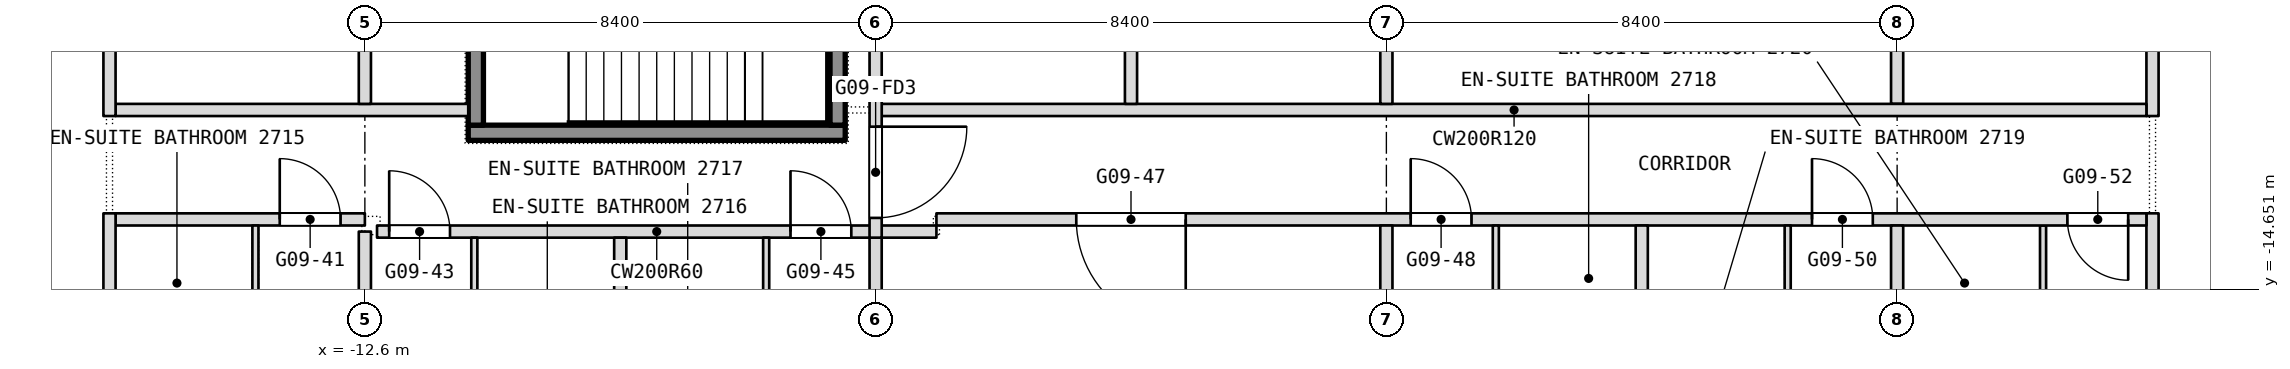
"""IFC4 building model, lengths in metres.
Left out: names, types, materials, properties, quantities, classifications, styles, units other than length and angle.
Written with IfcOpenShell. Run it as: python <this file> out.ifc"""

import sys

from ifc_helpers import new_model, si_unit, direction, frame, frame_2d, origin, place, context, subcontext, project, spatial, rectangle, extrude, element, fill, save


model = new_model("IFC4")
c1 = context("Model", 3, precision=1e-05, world=origin(), true_north=direction((0.0, 1.0)))
c2 = subcontext(c1, "Body", "Model", "MODEL_VIEW")
j1 = project(units=[si_unit("LENGTHUNIT", "METRE"), si_unit("PLANEANGLEUNIT", "RADIAN")], contexts=[c1])
p1 = place(None, origin())
s1 = spatial("IfcSite", under=j1, at=p1, CompositionType="ELEMENT")
p2 = place(p1, origin())
s2 = spatial("IfcBuilding", under=s1, at=p2, CompositionType="ELEMENT")
p3 = place(p2, frame((0.0, 0.0, 122.9)))
s3 = spatial("IfcBuildingStorey", under=s2, at=p3, CompositionType="ELEMENT", Elevation=122.9)
p4 = place(p3, frame((16.8, -22.186, 0.0), z_axis=(0.0, 0.0, 1.0), x_axis=(0.0, 1.0, 0.0)))
e1 = element("IfcWall", 1, at=p4, inside=s3, PredefinedType="PARTITIONING", context=c2, shape_type="SweptSolid", body=[
    extrude(rectangle(XDim=8.786, YDim=0.2, at=frame_2d((4.393, 0.0))), origin(), (0.0, 0.0, 1.0), 3.34),
])
p5 = place(p3, frame((16.8, -11.8, 0.0), z_axis=(0.0, 0.0, 1.0), x_axis=(0.0, 1.0, 0.0)))
e2 = element("IfcWall", 2, at=p5, inside=s3, PredefinedType="PARTITIONING", context=c2, shape_type="SweptSolid", body=[
    extrude(rectangle(XDim=9.9, YDim=0.2, at=frame_2d((4.95, 0.0))), origin(), (0.0, 0.0, 1.0), 3.34),
])
p6 = place(p3, frame((15.0, -16.45, 0.0), z_axis=(0.0, 0.0, 1.0), x_axis=(0.0, 1.0, 0.0)))
e3 = element("IfcWall", 3, at=p6, inside=s3, PredefinedType="PARTITIONING", context=c2, shape_type="SweptSolid", body=[
    extrude(rectangle(XDim=2.85, YDim=0.1, at=frame_2d((1.425, 0.0))), origin(), (0.0, 0.0, 1.0), 3.34),
])
p7 = place(p3, frame((-12.4, -13.7, 0.0), z_axis=(0.0, 0.0, 1.0), x_axis=(1.0, 0.0, 0.0)))
e4 = element("IfcWall", 4, at=p7, inside=s3, PredefinedType="PARTITIONING", context=c2, shape_type="SweptSolid", body=[
    extrude(rectangle(XDim=9.2, YDim=0.2, at=frame_2d((4.6, 0.0))), origin(), (0.0, 0.0, 1.0), 3.34),
])
p8 = place(p7, frame((0.2, 0.0, 0.0)))
e5 = element("IfcOpeningElement", 5, at=p8, cuts=e4, PredefinedType="OPENING", context=c2, shape_type="SweptSolid", body=[
    extrude(rectangle(XDim=1.0, YDim=2.1, at=frame_2d((0.5, 1.05))), frame((0.0, 0.1, 0.0), z_axis=(0.0, -1.0, 0.0), x_axis=(1.0, 0.0, 0.0)), (0.0, 0.0, 1.0), 0.2),
])
p9 = place(p7, frame((6.8, 0.0, 0.0)))
e6 = element("IfcOpeningElement", 6, at=p9, cuts=e4, PredefinedType="OPENING", context=c2, shape_type="SweptSolid", body=[
    extrude(rectangle(XDim=1.0, YDim=2.1, at=frame_2d((0.5, 1.05))), frame((0.0, 0.1, 0.0), z_axis=(0.0, -1.0, 0.0), x_axis=(1.0, 0.0, 0.0)), (0.0, 0.0, 1.0), 0.2),
])
p10 = place(p3, frame((-16.7, -13.5, 0.0), z_axis=(0.0, 0.0, 1.0), x_axis=(1.0, 0.0, 0.0)))
e7 = element("IfcWall", 7, at=p10, inside=s3, PredefinedType="PARTITIONING", context=c2, shape_type="SweptSolid", body=[
    extrude(rectangle(XDim=4.1, YDim=0.2, at=frame_2d((2.05, 0.0))), origin(), (0.0, 0.0, 1.0), 3.34),
])
p11 = place(p10, frame((2.7, 0.0, 0.0)))
e8 = element("IfcOpeningElement", 8, at=p11, cuts=e7, PredefinedType="OPENING", context=c2, shape_type="SweptSolid", body=[
    extrude(rectangle(XDim=1.0, YDim=2.1, at=frame_2d((0.5, 1.05))), frame((0.0, 0.1, 0.0), z_axis=(0.0, -1.0, 0.0), x_axis=(1.0, 0.0, 0.0)), (0.0, 0.0, 1.0), 0.2),
])
p12 = place(p3, frame((-3.2, -13.5, 0.0), z_axis=(0.0, 0.0, 1.0), x_axis=(1.0, 0.0, 0.0)))
e9 = element("IfcWall", 9, at=p12, inside=s3, PredefinedType="PARTITIONING", context=c2, shape_type="SweptSolid", body=[
    extrude(rectangle(XDim=19.9, YDim=0.2, at=frame_2d((9.95, 0.0))), origin(), (0.0, 0.0, 1.0), 3.34),
])
p13 = place(p12, frame((2.3, 0.0, 0.0)))
e10 = element("IfcOpeningElement", 10, at=p13, cuts=e9, PredefinedType="OPENING", context=c2, shape_type="SweptSolid", body=[
    extrude(rectangle(XDim=1.8, YDim=2.1, at=frame_2d((0.9, 1.05))), frame((0.0, 0.1, 0.0), z_axis=(0.0, -1.0, 0.0), x_axis=(1.0, 0.0, 0.0)), (0.0, 0.0, 1.0), 0.2),
])
p14 = place(p12, frame((7.8, 0.0, 0.0)))
e11 = element("IfcOpeningElement", 11, at=p14, cuts=e9, PredefinedType="OPENING", context=c2, shape_type="SweptSolid", body=[
    extrude(rectangle(XDim=1.0, YDim=2.1, at=frame_2d((0.5, 1.05))), frame((0.0, 0.1, 0.0), z_axis=(0.0, -1.0, 0.0), x_axis=(1.0, 0.0, 0.0)), (0.0, 0.0, 1.0), 0.2),
])
p15 = place(p12, frame((14.4, 0.0, 0.0)))
e12 = element("IfcOpeningElement", 12, at=p15, cuts=e9, PredefinedType="OPENING", context=c2, shape_type="SweptSolid", body=[
    extrude(rectangle(XDim=1.0, YDim=2.1, at=frame_2d((0.5, 1.05))), frame((0.0, 0.1, 0.0), z_axis=(0.0, -1.0, 0.0), x_axis=(1.0, 0.0, 0.0)), (0.0, 0.0, 1.0), 0.2),
])
p16 = place(p12, frame((18.6, 0.0, 0.0)))
e13 = element("IfcOpeningElement", 13, at=p16, cuts=e9, PredefinedType="OPENING", context=c2, shape_type="SweptSolid", body=[
    extrude(rectangle(XDim=1.0, YDim=2.1, at=frame_2d((0.5, 1.05))), frame((0.0, 0.1, 0.0), z_axis=(0.0, -1.0, 0.0), x_axis=(1.0, 0.0, 0.0)), (0.0, 0.0, 1.0), 0.2),
])
p17 = place(p3, frame((12.6, -21.175, 0.0), z_axis=(0.0, 0.0, 1.0), x_axis=(0.0, 1.0, 0.0)))
e14 = element("IfcWall", 14, at=p17, inside=s3, PredefinedType="PARTITIONING", context=c2, shape_type="SweptSolid", body=[
    extrude(rectangle(XDim=7.575, YDim=0.2, at=frame_2d((3.788, 0.0))), origin(), (0.0, 0.0, 1.0), 3.34),
])
p18 = place(p3, frame((12.6, -11.6, 0.0), z_axis=(0.0, 0.0, 1.0), x_axis=(0.0, 1.0, 0.0)))
e15 = element("IfcWall", 15, at=p18, inside=s3, PredefinedType="PARTITIONING", context=c2, shape_type="SweptSolid", body=[
    extrude(rectangle(XDim=3.9, YDim=0.2, at=frame_2d((1.95, 0.0))), origin(), (0.0, 0.0, 1.0), 3.34),
])
p19 = place(p3, frame((-16.7, -11.7, 0.0), z_axis=(0.0, 0.0, 1.0), x_axis=(1.0, 0.0, 0.0)))
e16 = element("IfcWall", 16, at=p19, inside=s3, PredefinedType="PARTITIONING", context=c2, shape_type="SweptSolid", body=[
    extrude(rectangle(XDim=5.8, YDim=0.2, at=frame_2d((2.9, 0.0))), origin(), (0.0, 0.0, 1.0), 3.34),
])
p20 = place(p3, frame((-4.1, -11.7, 0.0), z_axis=(0.0, 0.0, 1.0), x_axis=(1.0, 0.0, 0.0)))
e17 = element("IfcWall", 17, at=p20, inside=s3, PredefinedType="PARTITIONING", context=c2, shape_type="SweptSolid", body=[
    extrude(rectangle(XDim=20.8, YDim=0.2, at=frame_2d((10.4, 0.0))), origin(), (0.0, 0.0, 1.0), 3.34),
])
p21 = place(p3, frame((10.8, -17.35, 0.0), z_axis=(0.0, 0.0, 1.0), x_axis=(0.0, 1.0, 0.0)))
e18 = element("IfcWall", 18, at=p21, inside=s3, PredefinedType="PARTITIONING", context=c2, shape_type="SweptSolid", body=[
    extrude(rectangle(XDim=3.75, YDim=0.1, at=frame_2d((1.875, 0.0))), origin(), (0.0, 0.0, 1.0), 3.34),
])
p22 = place(p3, frame((8.4, -23.3, 0.0), z_axis=(0.0, 0.0, 1.0), x_axis=(0.0, 1.0, 0.0)))
e19 = element("IfcWall", 19, at=p22, inside=s3, PredefinedType="PARTITIONING", context=c2, shape_type="SweptSolid", body=[
    extrude(rectangle(XDim=9.7, YDim=0.2, at=frame_2d((4.85, 0.0))), origin(), (0.0, 0.0, 1.0), 3.34),
])
p23 = place(p3, frame((6.0, -17.45, 0.0), z_axis=(0.0, 0.0, 1.0), x_axis=(0.0, 1.0, 0.0)))
e20 = element("IfcWall", 20, at=p23, inside=s3, PredefinedType="PARTITIONING", context=c2, shape_type="SweptSolid", body=[
    extrude(rectangle(XDim=3.85, YDim=0.1, at=frame_2d((1.925, 0.0))), origin(), (0.0, 0.0, 1.0), 3.34),
])
p24 = place(p23, frame((1.355, 0.0, 0.0)))
e21 = element("IfcOpeningElement", 21, at=p24, cuts=e20, PredefinedType="OPENING", context=c2, shape_type="SweptSolid", body=[
    extrude(rectangle(XDim=0.9, YDim=2.1, at=frame_2d((0.45, 1.05))), frame((0.0, 0.05, 0.0), z_axis=(0.0, -1.0, 0.0), x_axis=(1.0, 0.0, 0.0)), (0.0, 0.0, 1.0), 0.1),
])
p25 = place(p3, frame((4.2, -23.3, 0.0), z_axis=(0.0, 0.0, 1.0), x_axis=(0.0, 1.0, 0.0)))
e22 = element("IfcWall", 22, at=p25, inside=s3, PredefinedType="PARTITIONING", context=c2, shape_type="SweptSolid", body=[
    extrude(rectangle(XDim=9.7, YDim=0.2, at=frame_2d((4.85, 0.0))), origin(), (0.0, 0.0, 1.0), 3.34),
])
for number, where, z_axis, x_axis in (
    (23, (4.2, -11.6, 0.0), (0.0, 0.0, 1.0), (0.0, 1.0, 0.0)),
    (24, (0.0, -11.6, 0.0), (0.0, 0.0, 1.0), (0.0, 1.0, 0.0)),
):
    element("IfcWall", number, at=place(p3, frame(where, z_axis=z_axis, x_axis=x_axis)), inside=s3, PredefinedType="PARTITIONING", context=c2, shape_type="SweptSolid", body=[
        extrude(rectangle(XDim=9.7, YDim=0.2, at=frame_2d((4.85, 0.0))), origin(), (0.0, 0.0, 1.0), 3.34),
    ])
p26 = place(p3, frame((-4.2, -23.3, 0.0), z_axis=(0.0, 0.0, 1.0), x_axis=(0.0, 1.0, 0.0)))
e25 = element("IfcWall", 25, at=p26, inside=s3, PredefinedType="PARTITIONING", context=c2, shape_type="SweptSolid", body=[
    extrude(rectangle(XDim=9.5, YDim=0.2, at=frame_2d((4.75, 0.0))), origin(), (0.0, 0.0, 1.0), 3.34),
])
p27 = place(p3, frame((-4.2, -13.8, 0.0), z_axis=(0.0, 0.0, 1.0), x_axis=(0.0, 1.0, 0.0)))
e26 = element("IfcWall", 26, at=p27, inside=s3, PredefinedType="PARTITIONING", context=c2, shape_type="SweptSolid", body=[
    extrude(rectangle(XDim=13.8, YDim=0.2, at=frame_2d((6.9, 0.0))), origin(), (0.0, 0.0, 1.0), 3.34),
])
p28 = place(p27, frame((12.15, 0.0, 0.0)))
e27 = element("IfcOpeningElement", 27, at=p28, cuts=e26, PredefinedType="OPENING", context=c2, shape_type="SweptSolid", body=[
    extrude(rectangle(XDim=1.5, YDim=2.1, at=frame_2d((0.75, 1.05))), frame((0.0, 0.1, 0.0), z_axis=(0.0, -1.0, 0.0), x_axis=(1.0, 0.0, 0.0)), (0.0, 0.0, 1.0), 0.2),
])
p29 = place(p27, frame((0.325, 0.0, 0.0)))
e28 = element("IfcOpeningElement", 28, at=p29, cuts=e26, PredefinedType="OPENING", context=c2, shape_type="SweptSolid", body=[
    extrude(rectangle(XDim=1.5, YDim=2.1, at=frame_2d((0.75, 1.05))), frame((0.0, 0.1, 0.0), z_axis=(0.0, -1.0, 0.0), x_axis=(1.0, 0.0, 0.0)), (0.0, 0.0, 1.0), 0.2),
])
p30 = place(p3, frame((-6.0, -16.65, 0.0), z_axis=(0.0, 0.0, 1.0), x_axis=(0.0, 1.0, 0.0)))
e29 = element("IfcWall", 29, at=p30, inside=s3, PredefinedType="PARTITIONING", context=c2, shape_type="SweptSolid", body=[
    extrude(rectangle(XDim=2.85, YDim=0.1, at=frame_2d((1.425, 0.0))), origin(), (0.0, 0.0, 1.0), 3.34),
])
p31 = place(p3, frame((-8.4, -23.3, 0.0), z_axis=(0.0, 0.0, 1.0), x_axis=(0.0, 1.0, 0.0)))
e30 = element("IfcWall", 30, at=p31, inside=s3, PredefinedType="PARTITIONING", context=c2, shape_type="SweptSolid", body=[
    extrude(rectangle(XDim=9.5, YDim=0.2, at=frame_2d((4.75, 0.0))), origin(), (0.0, 0.0, 1.0), 3.34),
])
p32 = place(p3, frame((-10.8, -17.65, 0.0), z_axis=(0.0, 0.0, 1.0), x_axis=(0.0, 1.0, 0.0)))
e31 = element("IfcWall", 31, at=p32, inside=s3, PredefinedType="PARTITIONING", context=c2, shape_type="SweptSolid", body=[
    extrude(rectangle(XDim=3.85, YDim=0.1, at=frame_2d((1.925, 0.0))), origin(), (0.0, 0.0, 1.0), 3.34),
])
p33 = place(p3, frame((-12.6, -21.175, 0.0), z_axis=(0.0, 0.0, 1.0), x_axis=(0.0, 1.0, 0.0)))
e32 = element("IfcWall", 32, at=p33, inside=s3, PredefinedType="PARTITIONING", context=c2, shape_type="SweptSolid", body=[
    extrude(rectangle(XDim=7.475, YDim=0.2, at=frame_2d((3.738, 0.0))), origin(), (0.0, 0.0, 1.0), 3.34),
])
p34 = place(p3, frame((-12.6, -11.6, 0.0), z_axis=(0.0, 0.0, 1.0), x_axis=(0.0, 1.0, 0.0)))
e33 = element("IfcWall", 33, at=p34, inside=s3, PredefinedType="PARTITIONING", context=c2, shape_type="SweptSolid", body=[
    extrude(rectangle(XDim=9.7, YDim=0.2, at=frame_2d((4.85, 0.0))), origin(), (0.0, 0.0, 1.0), 3.34),
])
p35 = place(p3, frame((-14.4, -16.45, 0.0), z_axis=(0.0, 0.0, 1.0), x_axis=(0.0, 1.0, 0.0)))
e34 = element("IfcWall", 34, at=p35, inside=s3, PredefinedType="PARTITIONING", context=c2, shape_type="SweptSolid", body=[
    extrude(rectangle(XDim=2.85, YDim=0.1, at=frame_2d((1.425, 0.0))), origin(), (0.0, 0.0, 1.0), 3.34),
])
p36 = place(p3, frame((-16.8, -22.186, 0.0), z_axis=(0.0, 0.0, 1.0), x_axis=(0.0, 1.0, 0.0)))
e35 = element("IfcWall", 35, at=p36, inside=s3, PredefinedType="PARTITIONING", context=c2, shape_type="SweptSolid", body=[
    extrude(rectangle(XDim=8.786, YDim=0.2, at=frame_2d((4.393, 0.0))), origin(), (0.0, 0.0, 1.0), 3.34),
])
p37 = place(p3, frame((-16.8, -11.8, 0.0), z_axis=(0.0, 0.0, 1.0), x_axis=(0.0, 1.0, 0.0)))
e36 = element("IfcWall", 36, at=p37, inside=s3, PredefinedType="PARTITIONING", context=c2, shape_type="SweptSolid", body=[
    extrude(rectangle(XDim=9.9, YDim=0.2, at=frame_2d((4.95, 0.0))), origin(), (0.0, 0.0, 1.0), 3.34),
])
p38 = place(p3, frame((-10.9, -12.075, 0.1), z_axis=(0.0, 0.0, 1.0), x_axis=(1.0, 0.0, 0.0)))
e37 = element("IfcWall", 37, at=p38, inside=s3, PredefinedType="SHEAR", context=c2, shape_type="SweptSolid", body=[
    extrude(rectangle(XDim=6.2, YDim=0.25, at=frame_2d((3.1, 0.0))), origin(), (0.0, 0.0, 1.0), 3.6),
])
for number, where, z_axis, x_axis in (
    (38, (-10.775, -11.95, 0.1), (0.0, 0.0, 1.0), (0.0, 1.0, 0.0)),
    (39, (-4.825, -11.95, 0.1), (0.0, 0.0, 1.0), (0.0, 1.0, 0.0)),
):
    element("IfcWall", number, at=place(p3, frame(where, z_axis=z_axis, x_axis=x_axis)), inside=s3, PredefinedType="SHEAR", context=c2, shape_type="SweptSolid", body=[
        extrude(rectangle(XDim=2.9, YDim=0.25, at=frame_2d((1.45, 0.0))), origin(), (0.0, 0.0, 1.0), 3.6),
    ])
p39 = place(p8, origin())
e40 = element("IfcDoor", 40, at=p39, inside=s3, OperationType="SINGLE_SWING_RIGHT", PredefinedType="DOOR", context=c2, shape_type="SweptSolid", body=[
    extrude(rectangle(XDim=1.0, YDim=2.1, at=frame_2d((0.5, 1.05))), frame((0.0, 0.025, 0.0), z_axis=(0.0, -1.0, 0.0), x_axis=(1.0, 0.0, 0.0)), (0.0, 0.0, 1.0), 0.05),
])
fill(e5, e40)
p40 = place(p9, origin())
e41 = element("IfcDoor", 41, at=p40, inside=s3, OperationType="SINGLE_SWING_LEFT", PredefinedType="DOOR", context=c2, shape_type="SweptSolid", body=[
    extrude(rectangle(XDim=1.0, YDim=2.1, at=frame_2d((0.5, 1.05))), frame((0.0, 0.025, 0.0), z_axis=(0.0, -1.0, 0.0), x_axis=(1.0, 0.0, 0.0)), (0.0, 0.0, 1.0), 0.05),
])
fill(e6, e41)
p41 = place(p11, origin())
e42 = element("IfcDoor", 42, at=p41, inside=s3, OperationType="SINGLE_SWING_LEFT", PredefinedType="DOOR", context=c2, shape_type="SweptSolid", body=[
    extrude(rectangle(XDim=1.0, YDim=2.1, at=frame_2d((0.5, 1.05))), frame((0.0, 0.025, 0.0), z_axis=(0.0, -1.0, 0.0), x_axis=(1.0, 0.0, 0.0)), (0.0, 0.0, 1.0), 0.05),
])
fill(e8, e42)
p42 = place(p13, origin())
e43 = element("IfcDoor", 43, at=p42, inside=s3, OperationType="DOUBLE_DOOR_SINGLE_SWING", PredefinedType="DOOR", context=c2, shape_type="SweptSolid", body=[
    extrude(rectangle(XDim=1.8, YDim=2.1, at=frame_2d((0.9, 1.05))), frame((0.0, 0.025, 0.0), z_axis=(0.0, -1.0, 0.0), x_axis=(1.0, 0.0, 0.0)), (0.0, 0.0, 1.0), 0.05),
])
fill(e10, e43)
p43 = place(p14, origin())
e44 = element("IfcDoor", 44, at=p43, inside=s3, OperationType="SINGLE_SWING_RIGHT", PredefinedType="DOOR", context=c2, shape_type="SweptSolid", body=[
    extrude(rectangle(XDim=1.0, YDim=2.1, at=frame_2d((0.5, 1.05))), frame((0.0, 0.025, 0.0), z_axis=(0.0, -1.0, 0.0), x_axis=(1.0, 0.0, 0.0)), (0.0, 0.0, 1.0), 0.05),
])
fill(e11, e44)
p44 = place(p15, origin())
e45 = element("IfcDoor", 45, at=p44, inside=s3, OperationType="SINGLE_SWING_RIGHT", PredefinedType="DOOR", context=c2, shape_type="SweptSolid", body=[
    extrude(rectangle(XDim=1.0, YDim=2.1, at=frame_2d((0.5, 1.05))), frame((0.0, 0.025, 0.0), z_axis=(0.0, -1.0, 0.0), x_axis=(1.0, 0.0, 0.0)), (0.0, 0.0, 1.0), 0.05),
])
fill(e12, e45)
p45 = place(p16, origin())
e46 = element("IfcDoor", 46, at=p45, inside=s3, OperationType="SINGLE_SWING_LEFT", PredefinedType="DOOR", context=c2, shape_type="SweptSolid", body=[
    extrude(rectangle(XDim=1.0, YDim=2.1, at=frame_2d((0.5, 1.05))), frame((0.0, 0.025, 0.0), z_axis=(0.0, -1.0, 0.0), x_axis=(1.0, 0.0, 0.0)), (0.0, 0.0, 1.0), 0.05),
])
fill(e13, e46)
p46 = place(p29, origin())
e47 = element("IfcDoor", 47, at=p46, inside=s3, OperationType="DOUBLE_DOOR_DOUBLE_SWING", PredefinedType="DOOR", context=c2, shape_type="SweptSolid", body=[
    extrude(rectangle(XDim=1.5, YDim=2.1, at=frame_2d((0.75, 1.05))), frame((0.0, 0.025, 0.0), z_axis=(0.0, -1.0, 0.0), x_axis=(1.0, 0.0, 0.0)), (0.0, 0.0, 1.0), 0.05),
])
fill(e28, e47)
save(model, sys.argv[1])
